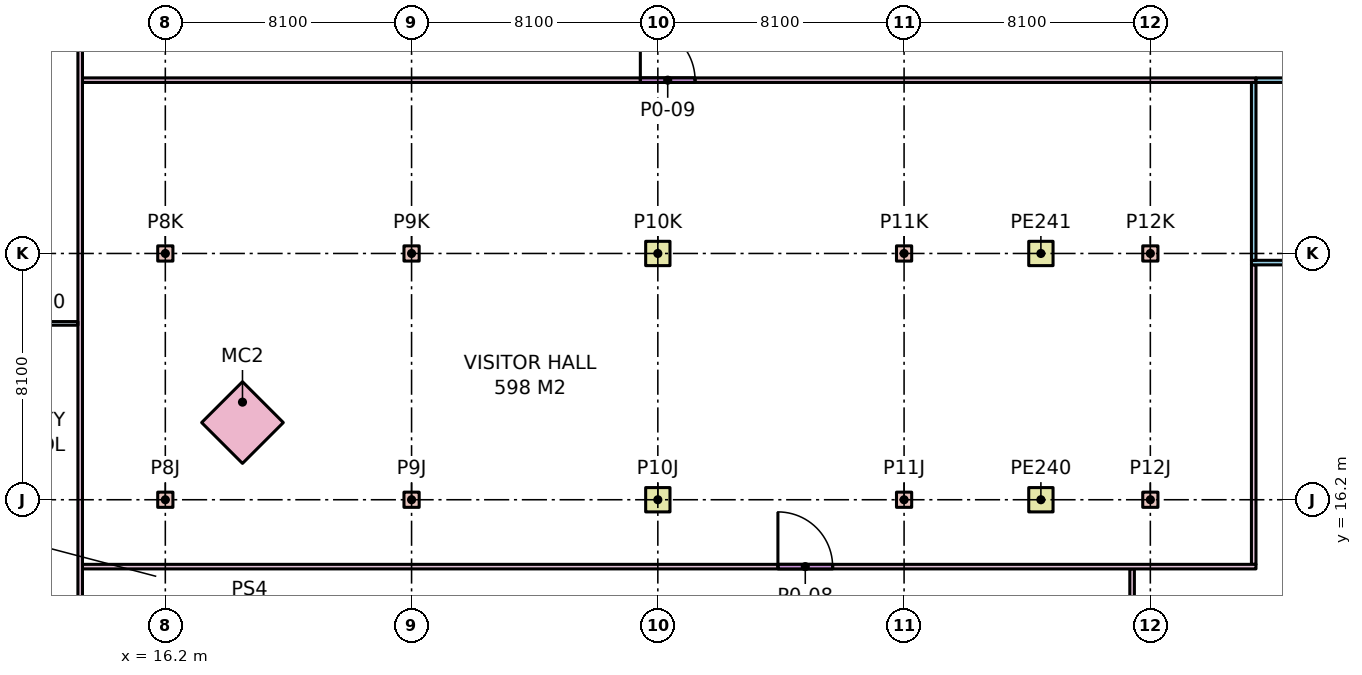
"""IFC4 building model, lengths in metres.
Left out: names, types, materials, properties, quantities, classifications, styles, units other than length and angle.
Written with IfcOpenShell. Run it as: python <this file> out.ifc"""

import sys

from ifc_helpers import new_model, si_unit, direction, frame, frame_2d, origin, origin_2d, place, context, subcontext, project, spatial, rectangle, extrude, element, fill, save


model = new_model("IFC4")
c1 = context("Model", 3, precision=1e-05, world=origin(), true_north=direction((0.0, 1.0)))
c2 = subcontext(c1, "Body", "Model", "MODEL_VIEW")
j1 = project(units=[si_unit("LENGTHUNIT", "METRE"), si_unit("PLANEANGLEUNIT", "RADIAN")], contexts=[c1])
p1 = place(None, origin())
s1 = spatial("IfcSite", under=j1, at=p1, CompositionType="ELEMENT")
p2 = place(p1, origin())
s2 = spatial("IfcBuilding", under=s1, at=p2, CompositionType="ELEMENT")
p3 = place(p2, origin())
s3 = spatial("IfcBuildingStorey", under=s2, at=p3, CompositionType="ELEMENT", Elevation=0.0)
for number, where, z_axis, x_axis in (
    (1, (16.2, 16.2, 0.0), (0.0, 0.0, 1.0), (1.0, 0.0, 0.0)),
    (2, (16.2, 24.3, 0.0), (0.0, 0.0, 1.0), (1.0, 0.0, 0.0)),
    (3, (24.3, 16.2, 0.0), (0.0, 0.0, 1.0), (1.0, 0.0, 0.0)),
    (4, (24.3, 24.3, 0.0), (0.0, 0.0, 1.0), (1.0, 0.0, 0.0)),
):
    element("IfcColumn", number, at=place(p3, frame(where, z_axis=z_axis, x_axis=x_axis)), inside=s3, PredefinedType="COLUMN", context=c2, shape_type="SweptSolid", body=[
        extrude(rectangle(XDim=0.5, YDim=0.5, at=origin_2d()), origin(), (0.0, 0.0, 1.0), 6.0),
    ])
for number, where, z_axis, x_axis in (
    (5, (32.4, 16.2, 0.0), (0.0, 0.0, 1.0), (1.0, 0.0, 0.0)),
    (6, (32.4, 24.3, 0.0), (0.0, 0.0, 1.0), (1.0, 0.0, 0.0)),
):
    element("IfcColumn", number, at=place(p3, frame(where, z_axis=z_axis, x_axis=x_axis)), inside=s3, PredefinedType="COLUMN", context=c2, shape_type="SweptSolid", body=[
        extrude(rectangle(XDim=0.8, YDim=0.8, at=origin_2d()), origin(), (0.0, 0.0, 1.0), 6.0),
    ])
for number, where, z_axis, x_axis in (
    (7, (40.5, 16.2, 0.0), (0.0, 0.0, 1.0), (1.0, 0.0, 0.0)),
    (8, (40.5, 24.3, 0.0), (0.0, 0.0, 1.0), (1.0, 0.0, 0.0)),
    (9, (48.6, 16.2, 0.0), (0.0, 0.0, 1.0), (1.0, 0.0, 0.0)),
    (10, (48.6, 24.3, 0.0), (0.0, 0.0, 1.0), (1.0, 0.0, 0.0)),
):
    element("IfcColumn", number, at=place(p3, frame(where, z_axis=z_axis, x_axis=x_axis)), inside=s3, PredefinedType="COLUMN", context=c2, shape_type="SweptSolid", body=[
        extrude(rectangle(XDim=0.5, YDim=0.5, at=origin_2d()), origin(), (0.0, 0.0, 1.0), 6.0),
    ])
for number, where, z_axis, x_axis in (
    (11, (45.0, 16.2, 0.0), (0.0, 0.0, 1.0), (1.0, 0.0, 0.0)),
    (12, (45.0, 24.3, 0.0), (0.0, 0.0, 1.0), (1.0, 0.0, 0.0)),
):
    element("IfcColumn", number, at=place(p3, frame(where, z_axis=z_axis, x_axis=x_axis)), inside=s3, PredefinedType="COLUMN", context=c2, shape_type="SweptSolid", body=[
        extrude(rectangle(XDim=0.8, YDim=0.8, at=origin_2d()), origin(), (0.0, 0.0, 1.0), 6.0),
    ])
p4 = place(p3, frame((18.738, 18.738, 0.0), z_axis=(0.0, 0.0, 1.0), x_axis=(-0.707106781187, 0.707106781187, 0.0)))
e13 = element("IfcColumn", 13, at=p4, inside=s3, PredefinedType="COLUMN", context=c2, shape_type="SweptSolid", body=[
    extrude(rectangle(XDim=1.9, YDim=1.9, at=origin_2d()), origin(), (0.0, 0.0, 1.0), 6.0),
])
p5 = place(p3, frame((51.925, 24.0, 0.0), z_axis=(0.0, 0.0, 1.0), x_axis=(1.0, 0.0, 0.0)))
e14 = element("IfcWall", 14, at=p5, inside=s3, PredefinedType="PARTITIONING", context=c2, shape_type="SweptSolid", body=[
    extrude(rectangle(XDim=4.515, YDim=0.15, at=frame_2d((2.257, 0.0))), origin(), (0.0, 0.0, 1.0), 5.68),
])
p6 = place(p3, frame((52.0, 14.075, 0.0), z_axis=(0.0, 0.0, 1.0), x_axis=(0.0, 1.0, 0.0)))
e15 = element("IfcWall", 15, at=p6, inside=s3, PredefinedType="PARTITIONING", context=c2, shape_type="SweptSolid", body=[
    extrude(rectangle(XDim=9.85, YDim=0.15, at=frame_2d((4.925, 0.0))), origin(), (0.0, 0.0, 1.0), 5.68),
])
p7 = place(p3, frame((48.0, 6.075, 0.0), z_axis=(0.0, 0.0, 1.0), x_axis=(0.0, 1.0, 0.0)))
e16 = element("IfcWall", 16, at=p7, inside=s3, PredefinedType="PARTITIONING", context=c2, shape_type="SweptSolid", body=[
    extrude(rectangle(XDim=7.85, YDim=0.15, at=frame_2d((3.925, 0.0))), origin(), (0.0, 0.0, 1.0), 5.68),
])
p8 = place(p3, frame((52.0, 24.075, 0.0), z_axis=(0.0, 0.0, 1.0), x_axis=(0.0, 1.0, 0.0)))
e17 = element("IfcWall", 17, at=p8, inside=s3, PredefinedType="PARTITIONING", context=c2, shape_type="SweptSolid", body=[
    extrude(rectangle(XDim=5.85, YDim=0.15, at=frame_2d((2.925, 0.0))), origin(), (0.0, 0.0, 1.0), 5.68),
])
p9 = place(p3, frame((52.075, 30.0, 0.0), z_axis=(0.0, 0.0, 1.0), x_axis=(1.0, 0.0, 0.0)))
e18 = element("IfcWall", 18, at=p9, inside=s3, PredefinedType="PARTITIONING", context=c2, shape_type="SweptSolid", body=[
    extrude(rectangle(XDim=4.0, YDim=0.15, at=frame_2d((2.0, 0.0))), origin(), (0.0, 0.0, 1.0), 5.68),
])
p10 = place(p9, frame((1.45, 0.0, 0.0)))
e19 = element("IfcOpeningElement", 19, at=p10, cuts=e18, PredefinedType="OPENING", context=c2, shape_type="SweptSolid", body=[
    extrude(rectangle(XDim=1.0, YDim=2.1, at=frame_2d((0.5, 1.05))), frame((0.0, 0.085, 0.0), z_axis=(0.0, -1.0, 0.0), x_axis=(1.0, 0.0, 0.0)), (0.0, 0.0, 1.0), 0.17),
])
p11 = place(p3, frame((13.475, 14.0, 0.0), z_axis=(0.0, 0.0, 1.0), x_axis=(1.0, 0.0, 0.0)))
e20 = element("IfcWall", 20, at=p11, inside=s3, PredefinedType="PARTITIONING", context=c2, shape_type="SweptSolid", body=[
    extrude(rectangle(XDim=38.6, YDim=0.15, at=frame_2d((19.3, 0.0))), origin(), (0.0, 0.0, 1.0), 5.68),
])
p12 = place(p11, frame((22.875, 0.0, 0.0)))
e21 = element("IfcOpeningElement", 21, at=p12, cuts=e20, PredefinedType="OPENING", context=c2, shape_type="SweptSolid", body=[
    extrude(rectangle(XDim=1.8, YDim=2.4, at=frame_2d((0.9, 1.2))), frame((0.0, 0.085, 0.0), z_axis=(0.0, -1.0, 0.0), x_axis=(1.0, 0.0, 0.0)), (0.0, 0.0, 1.0), 0.17),
])
p13 = place(p3, frame((13.475, 30.0, 0.0), z_axis=(0.0, 0.0, 1.0), x_axis=(1.0, 0.0, 0.0)))
e22 = element("IfcWall", 22, at=p13, inside=s3, PredefinedType="PARTITIONING", context=c2, shape_type="SweptSolid", body=[
    extrude(rectangle(XDim=38.6, YDim=0.15, at=frame_2d((19.3, 0.0))), origin(), (0.0, 0.0, 1.0), 5.68),
])
p14 = place(p13, frame((18.35, 0.0, 0.0)))
e23 = element("IfcOpeningElement", 23, at=p14, cuts=e22, PredefinedType="OPENING", context=c2, shape_type="SweptSolid", body=[
    extrude(rectangle(XDim=1.8, YDim=2.4, at=frame_2d((0.9, 1.2))), frame((0.0, 0.085, 0.0), z_axis=(0.0, -1.0, 0.0), x_axis=(1.0, 0.0, 0.0)), (0.0, 0.0, 1.0), 0.17),
])
p15 = place(p3, frame((13.4, 11.475, 0.0), z_axis=(0.0, 0.0, 1.0), x_axis=(0.0, 1.0, 0.0)))
e24 = element("IfcWall", 24, at=p15, inside=s3, PredefinedType="PARTITIONING", context=c2, shape_type="SweptSolid", body=[
    extrude(rectangle(XDim=32.025, YDim=0.15, at=frame_2d((16.012, 0.0))), origin(), (0.0, 0.0, 1.0), 5.68),
])
p16 = place(p3, frame((8.64, 22.0, 0.0), z_axis=(0.0, 0.0, 1.0), x_axis=(1.0, 0.0, 0.0)))
e25 = element("IfcWall", 25, at=p16, inside=s3, PredefinedType="PARTITIONING", context=c2, shape_type="SweptSolid", body=[
    extrude(rectangle(XDim=4.685, YDim=0.12, at=frame_2d((2.343, 0.0))), origin(), (0.0, 0.0, 1.0), 5.68),
])
p17 = place(p12, origin())
e26 = element("IfcDoor", 26, at=p17, inside=s3, OperationType="SINGLE_SWING_LEFT", PredefinedType="DOOR", context=c2, shape_type="SweptSolid", body=[
    extrude(rectangle(XDim=1.8, YDim=2.4, at=frame_2d((0.9, 1.2))), frame((0.0, 0.025, 0.0), z_axis=(0.0, -1.0, 0.0), x_axis=(1.0, 0.0, 0.0)), (0.0, 0.0, 1.0), 0.05),
])
fill(e21, e26)
p18 = place(p14, origin())
e27 = element("IfcDoor", 27, at=p18, inside=s3, OperationType="SINGLE_SWING_LEFT", PredefinedType="DOOR", context=c2, shape_type="SweptSolid", body=[
    extrude(rectangle(XDim=1.8, YDim=2.4, at=frame_2d((0.9, 1.2))), frame((0.0, 0.025, 0.0), z_axis=(0.0, -1.0, 0.0), x_axis=(1.0, 0.0, 0.0)), (0.0, 0.0, 1.0), 0.05),
])
fill(e23, e27)
save(model, sys.argv[1])
